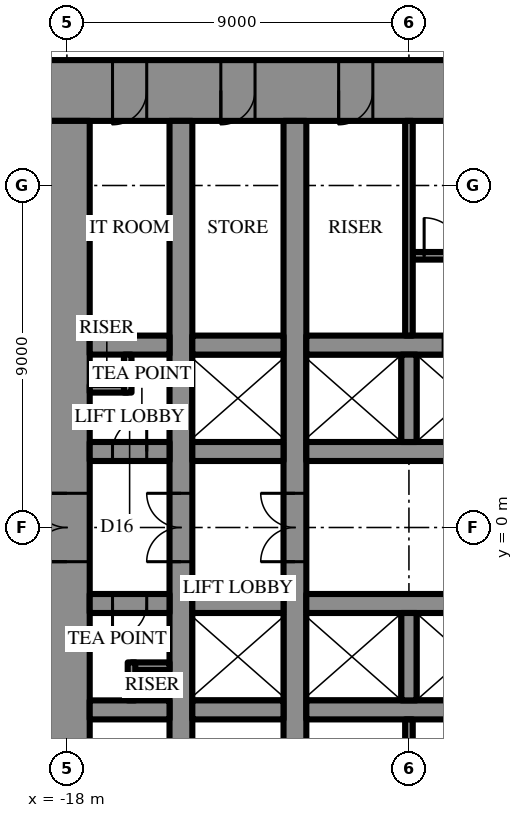
"""IFC4 building model, lengths in metres.
Left out: names, types, materials, properties, quantities, classifications, styles, units other than length and angle.
Written with IfcOpenShell. Run it as: python <this file> out.ifc"""

import sys

from ifc_helpers import new_model, si_unit, direction, frame, frame_2d, origin, place, context, subcontext, project, spatial, rectangle, extrude, element, fill, save


model = new_model("IFC4")
c1 = context("Model", 3, precision=1e-05, world=origin(), true_north=direction((0.0, 1.0)))
c2 = subcontext(c1, "Body", "Model", "MODEL_VIEW")
j1 = project(units=[si_unit("LENGTHUNIT", "METRE"), si_unit("PLANEANGLEUNIT", "RADIAN")], contexts=[c1])
p1 = place(None, origin())
s1 = spatial("IfcSite", under=j1, at=p1, CompositionType="ELEMENT")
p2 = place(p1, origin())
s2 = spatial("IfcBuilding", under=s1, at=p2, CompositionType="ELEMENT")
p3 = place(p2, frame((0.0, 0.0, 119.5)))
s3 = spatial("IfcBuildingStorey", under=s2, at=p3, CompositionType="ELEMENT", Elevation=119.5)
p4 = place(p3, frame((-18.6, 11.5, 0.0), z_axis=(0.0, 0.0, 1.0), x_axis=(1.0, 0.0, 0.0)))
e1 = element("IfcWall", 1, at=p4, inside=s3, PredefinedType="SHEAR", context=c2, shape_type="SweptSolid", body=[
    extrude(rectangle(XDim=37.2, YDim=1.6, at=frame_2d((18.6, 0.0))), origin(), (0.0, 0.0, 1.0), 4.2),
])
p5 = place(p4, frame((19.45, 0.0, 0.0)))
e2 = element("IfcOpeningElement", 2, at=p5, cuts=e1, PredefinedType="OPENING", context=c2, shape_type="SweptSolid", body=[
    extrude(rectangle(XDim=0.9, YDim=2.2, at=frame_2d((0.45, 1.1))), frame((0.0, 0.81, 0.0), z_axis=(0.0, -1.0, 0.0), x_axis=(1.0, 0.0, 0.0)), (0.0, 0.0, 1.0), 1.62),
])
p6 = place(p4, frame((22.45, 0.0, 0.0)))
e3 = element("IfcOpeningElement", 3, at=p6, cuts=e1, PredefinedType="OPENING", context=c2, shape_type="SweptSolid", body=[
    extrude(rectangle(XDim=0.9, YDim=2.2, at=frame_2d((0.45, 1.1))), frame((0.0, 0.81, 0.0), z_axis=(0.0, -1.0, 0.0), x_axis=(1.0, 0.0, 0.0)), (0.0, 0.0, 1.0), 1.62),
])
p7 = place(p4, frame((25.5, 0.0, 0.0)))
e4 = element("IfcOpeningElement", 4, at=p7, cuts=e1, PredefinedType="OPENING", context=c2, shape_type="SweptSolid", body=[
    extrude(rectangle(XDim=1.0, YDim=2.2, at=frame_2d((0.5, 1.1))), frame((0.0, 0.81, 0.0), z_axis=(0.0, -1.0, 0.0), x_axis=(1.0, 0.0, 0.0)), (0.0, 0.0, 1.0), 1.62),
])
p8 = place(p4, frame((1.8, 0.0, 0.0)))
e5 = element("IfcOpeningElement", 5, at=p8, cuts=e1, PredefinedType="OPENING", context=c2, shape_type="SweptSolid", body=[
    extrude(rectangle(XDim=0.9, YDim=2.2, at=frame_2d((0.45, 1.1))), frame((0.0, 0.81, 0.0), z_axis=(0.0, -1.0, 0.0), x_axis=(1.0, 0.0, 0.0)), (0.0, 0.0, 1.0), 1.62),
])
p9 = place(p4, frame((4.65, 0.0, 0.0)))
e6 = element("IfcOpeningElement", 6, at=p9, cuts=e1, PredefinedType="OPENING", context=c2, shape_type="SweptSolid", body=[
    extrude(rectangle(XDim=0.9, YDim=2.2, at=frame_2d((0.45, 1.1))), frame((0.0, 0.81, 0.0), z_axis=(0.0, -1.0, 0.0), x_axis=(1.0, 0.0, 0.0)), (0.0, 0.0, 1.0), 1.62),
])
p10 = place(p4, frame((7.75, 0.0, 0.0)))
e7 = element("IfcOpeningElement", 7, at=p10, cuts=e1, PredefinedType="OPENING", context=c2, shape_type="SweptSolid", body=[
    extrude(rectangle(XDim=0.9, YDim=2.2, at=frame_2d((0.45, 1.1))), frame((0.0, 0.81, 0.0), z_axis=(0.0, -1.0, 0.0), x_axis=(1.0, 0.0, 0.0)), (0.0, 0.0, 1.0), 1.62),
])
p11 = place(p4, frame((28.55, 0.0, 0.0)))
e8 = element("IfcOpeningElement", 8, at=p11, cuts=e1, PredefinedType="OPENING", context=c2, shape_type="SweptSolid", body=[
    extrude(rectangle(XDim=0.9, YDim=2.2, at=frame_2d((0.45, 1.1))), frame((0.0, 0.81, 0.0), z_axis=(0.0, -1.0, 0.0), x_axis=(1.0, 0.0, 0.0)), (0.0, 0.0, 1.0), 1.62),
])
p12 = place(p4, frame((31.65, 0.0, 0.0)))
e9 = element("IfcOpeningElement", 9, at=p12, cuts=e1, PredefinedType="OPENING", context=c2, shape_type="SweptSolid", body=[
    extrude(rectangle(XDim=0.9, YDim=2.2, at=frame_2d((0.45, 1.1))), frame((0.0, 0.81, 0.0), z_axis=(0.0, -1.0, 0.0), x_axis=(1.0, 0.0, 0.0)), (0.0, 0.0, 1.0), 1.62),
])
p13 = place(p4, frame((34.5, 0.0, 0.0)))
e10 = element("IfcOpeningElement", 10, at=p13, cuts=e1, PredefinedType="OPENING", context=c2, shape_type="SweptSolid", body=[
    extrude(rectangle(XDim=0.9, YDim=2.2, at=frame_2d((0.45, 1.1))), frame((0.0, 0.81, 0.0), z_axis=(0.0, -1.0, 0.0), x_axis=(1.0, 0.0, 0.0)), (0.0, 0.0, 1.0), 1.62),
])
p14 = place(p3, frame((-18.0, 10.7, 0.0), z_axis=(0.0, 0.0, 1.0), x_axis=(0.0, -1.0, 0.0)))
e11 = element("IfcWall", 11, at=p14, inside=s3, PredefinedType="SHEAR", context=c2, shape_type="SweptSolid", body=[
    extrude(rectangle(XDim=21.4, YDim=1.2, at=frame_2d((10.7, 0.0))), origin(), (0.0, 0.0, 1.0), 4.2),
])
p15 = place(p14, frame((9.8, 0.0, 0.0)))
e12 = element("IfcOpeningElement", 12, at=p15, cuts=e11, PredefinedType="OPENING", context=c2, shape_type="SweptSolid", body=[
    extrude(rectangle(XDim=1.8, YDim=2.4, at=frame_2d((0.9, 1.2))), frame((0.0, 0.61, 0.0), z_axis=(0.0, -1.0, 0.0), x_axis=(1.0, 0.0, 0.0)), (0.0, 0.0, 1.0), 1.22),
])
p16 = place(p3, frame((-12.0, -10.7, 0.0), z_axis=(0.0, 0.0, 1.0), x_axis=(0.0, 1.0, 0.0)))
e13 = element("IfcWall", 13, at=p16, inside=s3, PredefinedType="SHEAR", context=c2, shape_type="SweptSolid", body=[
    extrude(rectangle(XDim=21.4, YDim=0.6, at=frame_2d((10.7, 0.0))), origin(), (0.0, 0.0, 1.0), 4.2),
])
p17 = place(p16, frame((9.8, 0.0, 0.0)))
e14 = element("IfcOpeningElement", 14, at=p17, cuts=e13, PredefinedType="OPENING", context=c2, shape_type="SweptSolid", body=[
    extrude(rectangle(XDim=1.8, YDim=2.4, at=frame_2d((0.9, 1.2))), frame((0.0, 0.31, 0.0), z_axis=(0.0, -1.0, 0.0), x_axis=(1.0, 0.0, 0.0)), (0.0, 0.0, 1.0), 0.62),
])
p18 = place(p3, frame((-15.0, -10.7, 0.0), z_axis=(0.0, 0.0, 1.0), x_axis=(0.0, 1.0, 0.0)))
e15 = element("IfcWall", 15, at=p18, inside=s3, PredefinedType="SHEAR", context=c2, shape_type="SweptSolid", body=[
    extrude(rectangle(XDim=21.4, YDim=0.6, at=frame_2d((10.7, 0.0))), origin(), (0.0, 0.0, 1.0), 4.2),
])
p19 = place(p18, frame((9.8, 0.0, 0.0)))
e16 = element("IfcOpeningElement", 16, at=p19, cuts=e15, PredefinedType="OPENING", context=c2, shape_type="SweptSolid", body=[
    extrude(rectangle(XDim=1.8, YDim=2.4, at=frame_2d((0.9, 1.2))), frame((0.0, 0.31, 0.0), z_axis=(0.0, -1.0, 0.0), x_axis=(1.0, 0.0, 0.0)), (0.0, 0.0, 1.0), 0.62),
])
p20 = place(p3, frame((-17.4, 2.0, 0.0), z_axis=(0.0, 0.0, 1.0), x_axis=(1.0, 0.0, 0.0)))
e17 = element("IfcWall", 17, at=p20, inside=s3, PredefinedType="SHEAR", context=c2, shape_type="SweptSolid", body=[
    extrude(rectangle(XDim=2.1, YDim=0.5, at=frame_2d((1.05, 0.0))), origin(), (0.0, 0.0, 1.0), 4.2),
])
p21 = place(p20, frame((0.6, 0.0, 0.0)))
e18 = element("IfcOpeningElement", 18, at=p21, cuts=e17, PredefinedType="OPENING", context=c2, shape_type="SweptSolid", body=[
    extrude(rectangle(XDim=0.9, YDim=2.2, at=frame_2d((0.45, 1.1))), frame((0.0, 0.26, 0.0), z_axis=(0.0, -1.0, 0.0), x_axis=(1.0, 0.0, 0.0)), (0.0, 0.0, 1.0), 0.52),
])
p22 = place(p3, frame((-14.7, 2.0, 0.0), z_axis=(0.0, 0.0, 1.0), x_axis=(1.0, 0.0, 0.0)))
e19 = element("IfcWall", 19, at=p22, inside=s3, PredefinedType="SHEAR", context=c2, shape_type="SweptSolid", body=[
    extrude(rectangle(XDim=2.4, YDim=0.5, at=frame_2d((1.2, 0.0))), origin(), (0.0, 0.0, 1.0), 4.2),
])
p23 = place(p3, frame((-11.7, 2.0, 0.0), z_axis=(0.0, 0.0, 1.0), x_axis=(1.0, 0.0, 0.0)))
e20 = element("IfcWall", 20, at=p23, inside=s3, PredefinedType="SHEAR", context=c2, shape_type="SweptSolid", body=[
    extrude(rectangle(XDim=5.9, YDim=0.5, at=frame_2d((2.95, 0.0))), origin(), (0.0, 0.0, 1.0), 4.2),
])
p24 = place(p3, frame((-17.4, 4.8, 0.0), z_axis=(0.0, 0.0, 1.0), x_axis=(1.0, 0.0, 0.0)))
e21 = element("IfcWall", 21, at=p24, inside=s3, PredefinedType="SHEAR", context=c2, shape_type="SweptSolid", body=[
    extrude(rectangle(XDim=2.1, YDim=0.5, at=frame_2d((1.05, 0.0))), origin(), (0.0, 0.0, 1.0), 4.2),
])
p25 = place(p3, frame((-14.7, 4.8, 0.0), z_axis=(0.0, 0.0, 1.0), x_axis=(1.0, 0.0, 0.0)))
e22 = element("IfcWall", 22, at=p25, inside=s3, PredefinedType="SHEAR", context=c2, shape_type="SweptSolid", body=[
    extrude(rectangle(XDim=2.4, YDim=0.5, at=frame_2d((1.2, 0.0))), origin(), (0.0, 0.0, 1.0), 4.2),
])
p26 = place(p3, frame((-11.7, 4.8, 0.0), z_axis=(0.0, 0.0, 1.0), x_axis=(1.0, 0.0, 0.0)))
e23 = element("IfcWall", 23, at=p26, inside=s3, PredefinedType="SHEAR", context=c2, shape_type="SweptSolid", body=[
    extrude(rectangle(XDim=23.4, YDim=0.5, at=frame_2d((11.7, 0.0))), origin(), (0.0, 0.0, 1.0), 4.2),
])
p27 = place(p26, frame((6.6, 0.0, 0.0)))
e24 = element("IfcOpeningElement", 24, at=p27, cuts=e23, PredefinedType="OPENING", context=c2, shape_type="SweptSolid", body=[
    extrude(rectangle(XDim=1.2, YDim=2.2, at=frame_2d((0.6, 1.1))), frame((0.0, 0.26, 0.0), z_axis=(0.0, -1.0, 0.0), x_axis=(1.0, 0.0, 0.0)), (0.0, 0.0, 1.0), 0.52),
])
p28 = place(p26, frame((3.6, 0.0, 0.0)))
e25 = element("IfcOpeningElement", 25, at=p28, cuts=e23, PredefinedType="OPENING", context=c2, shape_type="SweptSolid", body=[
    extrude(rectangle(XDim=1.2, YDim=2.2, at=frame_2d((0.6, 1.1))), frame((0.0, 0.26, 0.0), z_axis=(0.0, -1.0, 0.0), x_axis=(1.0, 0.0, 0.0)), (0.0, 0.0, 1.0), 0.52),
])
p29 = place(p3, frame((-9.0, 2.25, 0.0), z_axis=(0.0, 0.0, 1.0), x_axis=(0.0, 1.0, 0.0)))
e26 = element("IfcWall", 26, at=p29, inside=s3, PredefinedType="SHEAR", context=c2, shape_type="SweptSolid", body=[
    extrude(rectangle(XDim=2.3, YDim=0.4, at=frame_2d((1.15, 0.0))), origin(), (0.0, 0.0, 1.0), 4.2),
])
p30 = place(p3, frame((-8.9, 7.15, 0.0), z_axis=(0.0, 0.0, 1.0), x_axis=(1.0, 0.0, 0.0)))
e27 = element("IfcWall", 27, at=p30, inside=s3, PredefinedType="SHEAR", context=c2, shape_type="SweptSolid", body=[
    extrude(rectangle(XDim=8.6, YDim=0.2, at=frame_2d((4.3, 0.0))), origin(), (0.0, 0.0, 1.0), 4.2),
])
p31 = place(p30, frame((0.3, 0.0, 0.0)))
e28 = element("IfcOpeningElement", 28, at=p31, cuts=e27, PredefinedType="OPENING", context=c2, shape_type="SweptSolid", body=[
    extrude(rectangle(XDim=1.0, YDim=2.2, at=frame_2d((0.5, 1.1))), frame((0.0, 0.11, 0.0), z_axis=(0.0, -1.0, 0.0), x_axis=(1.0, 0.0, 0.0)), (0.0, 0.0, 1.0), 0.22),
])
p32 = place(p3, frame((3.2, -2.0, 0.0), z_axis=(0.0, 0.0, 1.0), x_axis=(-1.0, 0.0, 0.0)))
e29 = element("IfcWall", 29, at=p32, inside=s3, PredefinedType="SHEAR", context=c2, shape_type="SweptSolid", body=[
    extrude(rectangle(XDim=14.9, YDim=0.5, at=frame_2d((7.45, 0.0))), origin(), (0.0, 0.0, 1.0), 4.2),
])
p33 = place(p32, frame((1.15, 0.0, 0.0)))
e30 = element("IfcOpeningElement", 30, at=p33, cuts=e29, PredefinedType="OPENING", context=c2, shape_type="SweptSolid", body=[
    extrude(rectangle(XDim=1.1, YDim=2.2, at=frame_2d((0.55, 1.1))), frame((0.0, 0.26, 0.0), z_axis=(0.0, -1.0, 0.0), x_axis=(1.0, 0.0, 0.0)), (0.0, 0.0, 1.0), 0.52),
])
p34 = place(p32, frame((4.15, 0.0, 0.0)))
e31 = element("IfcOpeningElement", 31, at=p34, cuts=e29, PredefinedType="OPENING", context=c2, shape_type="SweptSolid", body=[
    extrude(rectangle(XDim=1.1, YDim=2.2, at=frame_2d((0.55, 1.1))), frame((0.0, 0.26, 0.0), z_axis=(0.0, -1.0, 0.0), x_axis=(1.0, 0.0, 0.0)), (0.0, 0.0, 1.0), 0.52),
])
p35 = place(p32, frame((7.15, 0.0, 0.0)))
e32 = element("IfcOpeningElement", 32, at=p35, cuts=e29, PredefinedType="OPENING", context=c2, shape_type="SweptSolid", body=[
    extrude(rectangle(XDim=1.1, YDim=2.2, at=frame_2d((0.55, 1.1))), frame((0.0, 0.26, 0.0), z_axis=(0.0, -1.0, 0.0), x_axis=(1.0, 0.0, 0.0)), (0.0, 0.0, 1.0), 0.52),
])
p36 = place(p32, frame((10.15, 0.0, 0.0)))
e33 = element("IfcOpeningElement", 33, at=p36, cuts=e29, PredefinedType="OPENING", context=c2, shape_type="SweptSolid", body=[
    extrude(rectangle(XDim=1.1, YDim=2.2, at=frame_2d((0.55, 1.1))), frame((0.0, 0.26, 0.0), z_axis=(0.0, -1.0, 0.0), x_axis=(1.0, 0.0, 0.0)), (0.0, 0.0, 1.0), 0.52),
])
p37 = place(p3, frame((-12.3, -2.0, 0.0), z_axis=(0.0, 0.0, 1.0), x_axis=(-1.0, 0.0, 0.0)))
e34 = element("IfcWall", 34, at=p37, inside=s3, PredefinedType="SHEAR", context=c2, shape_type="SweptSolid", body=[
    extrude(rectangle(XDim=2.4, YDim=0.5, at=frame_2d((1.2, 0.0))), origin(), (0.0, 0.0, 1.0), 4.2),
])
p38 = place(p3, frame((-15.3, -2.0, 0.0), z_axis=(0.0, 0.0, 1.0), x_axis=(-1.0, 0.0, 0.0)))
e35 = element("IfcWall", 35, at=p38, inside=s3, PredefinedType="SHEAR", context=c2, shape_type="SweptSolid", body=[
    extrude(rectangle(XDim=2.1, YDim=0.5, at=frame_2d((1.05, 0.0))), origin(), (0.0, 0.0, 1.0), 4.2),
])
p39 = place(p38, frame((0.6, 0.0, 0.0)))
e36 = element("IfcOpeningElement", 36, at=p39, cuts=e35, PredefinedType="OPENING", context=c2, shape_type="SweptSolid", body=[
    extrude(rectangle(XDim=0.9, YDim=2.2, at=frame_2d((0.45, 1.1))), frame((0.0, 0.26, 0.0), z_axis=(0.0, -1.0, 0.0), x_axis=(1.0, 0.0, 0.0)), (0.0, 0.0, 1.0), 0.52),
])
p40 = place(p3, frame((11.7, -4.8, 0.0), z_axis=(0.0, 0.0, 1.0), x_axis=(-1.0, 0.0, 0.0)))
e37 = element("IfcWall", 37, at=p40, inside=s3, PredefinedType="SHEAR", context=c2, shape_type="SweptSolid", body=[
    extrude(rectangle(XDim=23.4, YDim=0.5, at=frame_2d((11.7, 0.0))), origin(), (0.0, 0.0, 1.0), 4.2),
])
p41 = place(p40, frame((6.6, 0.0, 0.0)))
e38 = element("IfcOpeningElement", 38, at=p41, cuts=e37, PredefinedType="OPENING", context=c2, shape_type="SweptSolid", body=[
    extrude(rectangle(XDim=1.2, YDim=2.2, at=frame_2d((0.6, 1.1))), frame((0.0, 0.26, 0.0), z_axis=(0.0, -1.0, 0.0), x_axis=(1.0, 0.0, 0.0)), (0.0, 0.0, 1.0), 0.52),
])
p42 = place(p40, frame((3.6, 0.0, 0.0)))
e39 = element("IfcOpeningElement", 39, at=p42, cuts=e37, PredefinedType="OPENING", context=c2, shape_type="SweptSolid", body=[
    extrude(rectangle(XDim=1.2, YDim=2.2, at=frame_2d((0.6, 1.1))), frame((0.0, 0.26, 0.0), z_axis=(0.0, -1.0, 0.0), x_axis=(1.0, 0.0, 0.0)), (0.0, 0.0, 1.0), 0.52),
])
p43 = place(p3, frame((-12.3, -4.8, 0.0), z_axis=(0.0, 0.0, 1.0), x_axis=(-1.0, 0.0, 0.0)))
e40 = element("IfcWall", 40, at=p43, inside=s3, PredefinedType="SHEAR", context=c2, shape_type="SweptSolid", body=[
    extrude(rectangle(XDim=2.4, YDim=0.5, at=frame_2d((1.2, 0.0))), origin(), (0.0, 0.0, 1.0), 4.2),
])
p44 = place(p3, frame((-15.3, -4.8, 0.0), z_axis=(0.0, 0.0, 1.0), x_axis=(-1.0, 0.0, 0.0)))
e41 = element("IfcWall", 41, at=p44, inside=s3, PredefinedType="SHEAR", context=c2, shape_type="SweptSolid", body=[
    extrude(rectangle(XDim=2.1, YDim=0.5, at=frame_2d((1.05, 0.0))), origin(), (0.0, 0.0, 1.0), 4.2),
])
p45 = place(p3, frame((-9.0, -2.25, 0.0), z_axis=(0.0, 0.0, 1.0), x_axis=(0.0, -1.0, 0.0)))
e42 = element("IfcWall", 42, at=p45, inside=s3, PredefinedType="SHEAR", context=c2, shape_type="SweptSolid", body=[
    extrude(rectangle(XDim=2.3, YDim=0.4, at=frame_2d((1.15, 0.0))), origin(), (0.0, 0.0, 1.0), 4.2),
])
for number, where, z_axis, x_axis in (
    (43, (-9.0, 5.05, 0.0), (0.0, 0.0, 1.0), (0.0, 1.0, 0.0)),
    (44, (-9.0, -5.05, 0.0), (0.0, 0.0, 1.0), (0.0, -1.0, 0.0)),
):
    element("IfcWall", number, at=place(p3, frame(where, z_axis=z_axis, x_axis=x_axis)), inside=s3, PredefinedType="PARTITIONING", context=c2, shape_type="SweptSolid", body=[
        extrude(rectangle(XDim=5.65, YDim=0.2, at=frame_2d((2.825, 0.0))), origin(), (0.0, 0.0, 1.0), 4.0),
    ])
for number, where, z_axis, x_axis in (
    (45, (-17.4, 3.65, 0.0), (0.0, 0.0, 1.0), (1.0, 0.0, 0.0)),
    (46, (-16.4, 3.55, 0.0), (0.0, 0.0, 1.0), (0.0, 1.0, 0.0)),
    (47, (-15.3, -3.65, 0.0), (0.0, 0.0, 1.0), (-1.0, 0.0, 0.0)),
    (48, (-16.3, -3.55, 0.0), (0.0, 0.0, 1.0), (0.0, -1.0, 0.0)),
):
    element("IfcWall", number, at=place(p3, frame(where, z_axis=z_axis, x_axis=x_axis)), inside=s3, PredefinedType="PARTITIONING", context=c2, shape_type="SweptSolid", body=[
        extrude(rectangle(XDim=1.0, YDim=0.2, at=frame_2d((0.5, 0.0))), origin(), (0.0, 0.0, 1.0), 4.0),
    ])
p46 = place(p15, frame((1.8, 0.0, 0.0), z_axis=(0.0, 0.0, 1.0), x_axis=(-1.0, 0.0, 0.0)))
e49 = element("IfcDoor", 49, at=p46, inside=s3, OperationType="DOUBLE_DOOR_SINGLE_SWING", PredefinedType="DOOR", context=c2, shape_type="SweptSolid", body=[
    extrude(rectangle(XDim=1.8, YDim=2.4, at=frame_2d((0.9, 1.2))), frame((0.0, 0.025, 0.0), z_axis=(0.0, -1.0, 0.0), x_axis=(1.0, 0.0, 0.0)), (0.0, 0.0, 1.0), 0.05),
])
fill(e12, e49)
p47 = place(p31, origin())
e50 = element("IfcDoor", 50, at=p47, inside=s3, OperationType="SINGLE_SWING_RIGHT", PredefinedType="DOOR", context=c2, shape_type="SweptSolid", body=[
    extrude(rectangle(XDim=1.0, YDim=2.2, at=frame_2d((0.5, 1.1))), frame((0.0, 0.025, 0.0), z_axis=(0.0, -1.0, 0.0), x_axis=(1.0, 0.0, 0.0)), (0.0, 0.0, 1.0), 0.05),
])
fill(e28, e50)
p48 = place(p8, frame((0.9, 0.0, 0.0), z_axis=(0.0, 0.0, 1.0), x_axis=(-1.0, 0.0, 0.0)))
e51 = element("IfcDoor", 51, at=p48, inside=s3, OperationType="SINGLE_SWING_LEFT", PredefinedType="DOOR", context=c2, shape_type="SweptSolid", body=[
    extrude(rectangle(XDim=0.9, YDim=2.2, at=frame_2d((0.45, 1.1))), frame((0.0, 0.025, 0.0), z_axis=(0.0, -1.0, 0.0), x_axis=(1.0, 0.0, 0.0)), (0.0, 0.0, 1.0), 0.05),
])
fill(e5, e51)
p49 = place(p9, frame((0.9, 0.0, 0.0), z_axis=(0.0, 0.0, 1.0), x_axis=(-1.0, 0.0, 0.0)))
e52 = element("IfcDoor", 52, at=p49, inside=s3, OperationType="SINGLE_SWING_LEFT", PredefinedType="DOOR", context=c2, shape_type="SweptSolid", body=[
    extrude(rectangle(XDim=0.9, YDim=2.2, at=frame_2d((0.45, 1.1))), frame((0.0, 0.025, 0.0), z_axis=(0.0, -1.0, 0.0), x_axis=(1.0, 0.0, 0.0)), (0.0, 0.0, 1.0), 0.05),
])
fill(e6, e52)
p50 = place(p10, frame((0.9, 0.0, 0.0), z_axis=(0.0, 0.0, 1.0), x_axis=(-1.0, 0.0, 0.0)))
e53 = element("IfcDoor", 53, at=p50, inside=s3, OperationType="SINGLE_SWING_LEFT", PredefinedType="DOOR", context=c2, shape_type="SweptSolid", body=[
    extrude(rectangle(XDim=0.9, YDim=2.2, at=frame_2d((0.45, 1.1))), frame((0.0, 0.025, 0.0), z_axis=(0.0, -1.0, 0.0), x_axis=(1.0, 0.0, 0.0)), (0.0, 0.0, 1.0), 0.05),
])
fill(e7, e53)
p51 = place(p21, origin())
e54 = element("IfcDoor", 54, at=p51, inside=s3, OperationType="SINGLE_SWING_LEFT", PredefinedType="DOOR", context=c2, shape_type="SweptSolid", body=[
    extrude(rectangle(XDim=0.9, YDim=2.2, at=frame_2d((0.45, 1.1))), frame((0.0, 0.025, 0.0), z_axis=(0.0, -1.0, 0.0), x_axis=(1.0, 0.0, 0.0)), (0.0, 0.0, 1.0), 0.05),
])
fill(e18, e54)
p52 = place(p39, origin())
e55 = element("IfcDoor", 55, at=p52, inside=s3, OperationType="SINGLE_SWING_LEFT", PredefinedType="DOOR", context=c2, shape_type="SweptSolid", body=[
    extrude(rectangle(XDim=0.9, YDim=2.2, at=frame_2d((0.45, 1.1))), frame((0.0, 0.025, 0.0), z_axis=(0.0, -1.0, 0.0), x_axis=(1.0, 0.0, 0.0)), (0.0, 0.0, 1.0), 0.05),
])
fill(e36, e55)
p53 = place(p17, origin())
e56 = element("IfcDoor", 56, at=p53, inside=s3, OperationType="DOUBLE_DOOR_SINGLE_SWING", PredefinedType="DOOR", context=c2, shape_type="SweptSolid", body=[
    extrude(rectangle(XDim=1.8, YDim=2.4, at=frame_2d((0.9, 1.2))), frame((0.0, 0.025, 0.0), z_axis=(0.0, -1.0, 0.0), x_axis=(1.0, 0.0, 0.0)), (0.0, 0.0, 1.0), 0.05),
])
fill(e14, e56)
p54 = place(p19, origin())
e57 = element("IfcDoor", 57, at=p54, inside=s3, OperationType="DOUBLE_DOOR_SINGLE_SWING", PredefinedType="DOOR", context=c2, shape_type="SweptSolid", body=[
    extrude(rectangle(XDim=1.8, YDim=2.4, at=frame_2d((0.9, 1.2))), frame((0.0, 0.025, 0.0), z_axis=(0.0, -1.0, 0.0), x_axis=(1.0, 0.0, 0.0)), (0.0, 0.0, 1.0), 0.05),
])
fill(e16, e57)
save(model, sys.argv[1])
